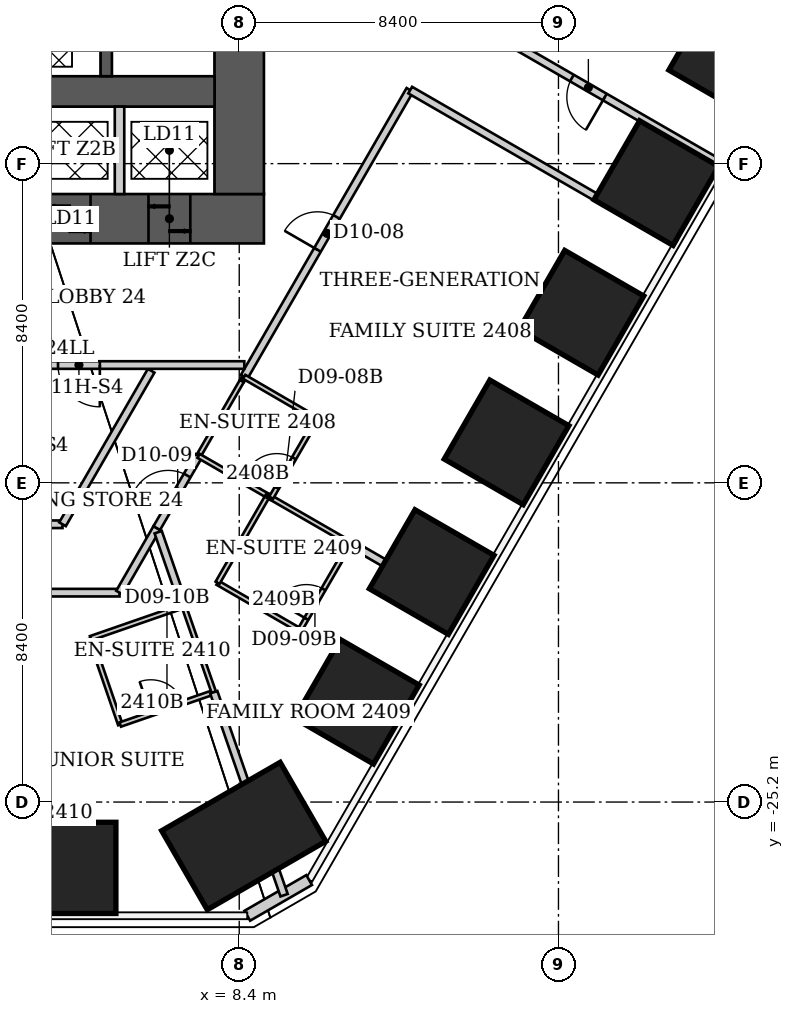
"""IFC4 building model, lengths in metres.
Left out: names, types, materials, properties, quantities, classifications, styles, units other than length and angle.
Written with IfcOpenShell. Run it as: python <this file> out.ifc"""

import sys

from ifc_helpers import new_model, si_unit, direction, frame, frame_2d, origin, origin_2d, place, context, subcontext, project, spatial, rectangle, extrude, element, fill, save


model = new_model("IFC4")
c1 = context("Model", 3, precision=1e-05, world=origin(), true_north=direction((0.0, 1.0)))
c2 = subcontext(c1, "Body", "Model", "MODEL_VIEW")
j1 = project(units=[si_unit("LENGTHUNIT", "METRE"), si_unit("PLANEANGLEUNIT", "RADIAN")], contexts=[c1])
p1 = place(None, origin())
s1 = spatial("IfcSite", under=j1, at=p1, CompositionType="ELEMENT")
p2 = place(p1, origin())
s2 = spatial("IfcBuilding", under=s1, at=p2, CompositionType="ELEMENT")
p3 = place(p2, frame((0.0, 0.0, 100.6)))
s3 = spatial("IfcBuildingStorey", under=s2, at=p3, CompositionType="ELEMENT", Elevation=100.6)
for number, where, z_axis, x_axis in (
    (1, (21.344, -5.499, 0.0), (0.0, 0.0, 1.0), (0.866, -0.5, 0.0)),
    (2, (19.374, -8.911, 0.0), (0.0, 0.0, 1.0), (0.866, -0.5, 0.0)),
    (3, (17.404, -12.323, 0.0), (0.0, 0.0, 1.0), (0.866, -0.5, 0.0)),
    (4, (15.434, -15.735, 0.0), (0.0, 0.0, 1.0), (0.866, -0.5, 0.0)),
    (5, (13.464, -19.147, 0.0), (0.0, 0.0, 1.0), (0.866, -0.5, 0.0)),
    (6, (11.494, -22.559, 0.0), (0.0, 0.0, 1.0), (0.866, -0.5, 0.0)),
):
    element("IfcColumn", number, at=place(p3, frame(where, z_axis=z_axis, x_axis=x_axis)), inside=s3, PredefinedType="COLUMN", context=c2, shape_type="SweptSolid", body=[
        extrude(rectangle(XDim=2.4, YDim=2.4, at=origin_2d()), origin(), (0.0, 0.0, 1.0), 3.8),
    ])
p4 = place(p3, frame((8.518, -26.094, 0.0), z_axis=(0.0, 0.0, 1.0), x_axis=(0.5, -0.866025403784, 0.0)))
e7 = element("IfcColumn", 7, at=p4, inside=s3, PredefinedType="COLUMN", context=c2, shape_type="SweptSolid", body=[
    extrude(rectangle(XDim=2.4, YDim=3.6, at=origin_2d()), origin(), (0.0, 0.0, 1.0), 3.8),
])
p5 = place(p3, frame((3.955, -26.932, 0.0), z_axis=(0.0, 0.0, 1.0), x_axis=(0.0, -1.0, 0.0)))
e8 = element("IfcColumn", 8, at=p5, inside=s3, PredefinedType="COLUMN", context=c2, shape_type="SweptSolid", body=[
    extrude(rectangle(XDim=2.4, YDim=2.4, at=origin_2d()), origin(), (0.0, 0.0, 1.0), 3.8),
])
p6 = place(p3, frame((-9.05, -9.85, 0.0), z_axis=(0.0, 0.0, 1.0), x_axis=(1.0, 0.0, 0.0)))
e9 = element("IfcWall", 9, at=p6, inside=s3, PredefinedType="SHEAR", context=c2, shape_type="SweptSolid", body=[
    extrude(rectangle(XDim=18.1, YDim=1.3, at=frame_2d((9.05, 0.0))), origin(), (0.0, 0.0, 1.0), 3.8),
])
p7 = place(p6, frame((1.938, 0.0, 0.0)))
e10 = element("IfcOpeningElement", 10, at=p7, cuts=e9, PredefinedType="OPENING", context=c2, shape_type="SweptSolid", body=[
    extrude(rectangle(XDim=1.1, YDim=2.2, at=frame_2d((0.55, 1.1))), frame((0.0, 0.65, 0.0), z_axis=(0.0, -1.0, 0.0), x_axis=(1.0, 0.0, 0.0)), (0.0, 0.0, 1.0), 1.3),
])
p8 = place(p6, frame((9.812, 0.0, 0.0)))
e11 = element("IfcOpeningElement", 11, at=p8, cuts=e9, PredefinedType="OPENING", context=c2, shape_type="SweptSolid", body=[
    extrude(rectangle(XDim=1.1, YDim=2.1, at=frame_2d((0.55, 1.05))), frame((0.0, 0.65, 0.0), z_axis=(0.0, -1.0, 0.0), x_axis=(1.0, 0.0, 0.0)), (0.0, 0.0, 1.0), 1.3),
])
p9 = place(p6, frame((12.438, 0.0, 0.0)))
e12 = element("IfcOpeningElement", 12, at=p9, cuts=e9, PredefinedType="OPENING", context=c2, shape_type="SweptSolid", body=[
    extrude(rectangle(XDim=1.1, YDim=2.1, at=frame_2d((0.55, 1.05))), frame((0.0, 0.65, 0.0), z_axis=(0.0, -1.0, 0.0), x_axis=(1.0, 0.0, 0.0)), (0.0, 0.0, 1.0), 1.3),
])
p10 = place(p6, frame((15.062, 0.0, 0.0)))
e13 = element("IfcOpeningElement", 13, at=p10, cuts=e9, PredefinedType="OPENING", context=c2, shape_type="SweptSolid", body=[
    extrude(rectangle(XDim=1.1, YDim=2.1, at=frame_2d((0.55, 1.05))), frame((0.0, 0.65, 0.0), z_axis=(0.0, -1.0, 0.0), x_axis=(1.0, 0.0, 0.0)), (0.0, 0.0, 1.0), 1.3),
])
p11 = place(p3, frame((8.4, -9.2, 0.0), z_axis=(0.0, 0.0, 1.0), x_axis=(0.0, 1.0, 0.0)))
e14 = element("IfcWall", 14, at=p11, inside=s3, PredefinedType="SHEAR", context=c2, shape_type="SweptSolid", body=[
    extrude(rectangle(XDim=15.3, YDim=1.3, at=frame_2d((7.65, 0.0))), origin(), (0.0, 0.0, 1.0), 3.8),
])
p12 = place(p11, frame((10.7, 0.0, 0.0)))
e15 = element("IfcOpeningElement", 15, at=p12, cuts=e14, PredefinedType="OPENING", context=c2, shape_type="SweptSolid", body=[
    extrude(rectangle(XDim=1.2, YDim=2.2, at=frame_2d((0.6, 1.1))), frame((0.0, 0.65, 0.0), z_axis=(0.0, -1.0, 0.0), x_axis=(1.0, 0.0, 0.0)), (0.0, 0.0, 1.0), 1.3),
])
p13 = place(p3, frame((-7.75, -6.5, 0.0), z_axis=(0.0, 0.0, 1.0), x_axis=(1.0, 0.0, 0.0)))
e16 = element("IfcWall", 16, at=p13, inside=s3, PredefinedType="SHEAR", context=c2, shape_type="SweptSolid", body=[
    extrude(rectangle(XDim=15.5, YDim=0.8, at=frame_2d((7.75, 0.0))), origin(), (0.0, 0.0, 1.0), 3.8),
])
p14 = place(p3, frame((4.9, -6.1, 0.0), z_axis=(0.0, 0.0, 1.0), x_axis=(0.0, 1.0, 0.0)))
e17 = element("IfcWall", 17, at=p14, inside=s3, PredefinedType="SHEAR", context=c2, shape_type="SweptSolid", body=[
    extrude(rectangle(XDim=7.2, YDim=0.3, at=frame_2d((3.6, 0.0))), origin(), (0.0, 0.0, 1.0), 3.8),
])
p15 = place(p3, frame((5.25, -9.2, 0.0), z_axis=(0.0, 0.0, 1.0), x_axis=(0.0, 1.0, 0.0)))
e18 = element("IfcWall", 18, at=p15, inside=s3, PredefinedType="PARTITIONING", context=c2, shape_type="SweptSolid", body=[
    extrude(rectangle(XDim=2.3, YDim=0.25, at=frame_2d((1.15, 0.0))), origin(), (0.0, 0.0, 1.0), 3.8),
])
p16 = place(p3, frame((10.24, -27.252, 0.0), z_axis=(0.0, 0.0, 1.0), x_axis=(-0.866045024864, -0.499966013754, 0.0)))
e19 = element("IfcWall", 19, at=p16, inside=s3, PredefinedType="SOLIDWALL", context=c2, shape_type="SweptSolid", body=[
    extrude(rectangle(XDim=1.88, YDim=0.3, at=frame_2d((0.94, 0.0))), origin(), (0.0, 0.0, 1.0), 3.64),
])
p17 = place(p3, frame((1.215, -19.69, 0.0), z_axis=(0.0, 0.0, 1.0), x_axis=(1.0, 0.0, 0.0)))
e20 = element("IfcWall", 20, at=p17, inside=s3, PredefinedType="PARTITIONING", context=c2, shape_type="SweptSolid", body=[
    extrude(rectangle(XDim=4.035, YDim=0.2, at=frame_2d((2.018, 0.0))), origin(), (0.0, 0.0, 1.0), 3.64),
])
p18 = place(p3, frame((3.75, -17.89, 0.0), z_axis=(0.0, 0.0, 1.0), x_axis=(-1.0, 0.0, 0.0)))
e21 = element("IfcWall", 21, at=p18, inside=s3, PredefinedType="PARTITIONING", context=c2, shape_type="SweptSolid", body=[
    extrude(rectangle(XDim=2.15, YDim=0.2, at=frame_2d((1.075, 0.0))), origin(), (0.0, 0.0, 1.0), 3.64),
])
p19 = place(p3, frame((4.49, -20.89, 0.0), z_axis=(0.0, 0.0, 1.0), x_axis=(0.324971746724, -0.945723724896, 0.0)))
e22 = element("IfcWall", 22, at=p19, inside=s3, PredefinedType="PARTITIONING", context=c2, shape_type="SweptSolid", body=[
    extrude(rectangle(XDim=2.4, YDim=0.12, at=frame_2d((1.2, 0.0))), origin(), (0.0, 0.0, 1.0), 3.64),
])
p20 = place(p3, frame((5.25, -19.69, 0.0), z_axis=(0.0, 0.0, 1.0), x_axis=(0.499431599995, 0.866353321068, 0.0)))
e23 = element("IfcWall", 23, at=p20, inside=s3, PredefinedType="PARTITIONING", context=c2, shape_type="SweptSolid", body=[
    extrude(rectangle(XDim=1.962, YDim=0.2, at=frame_2d((0.981, 0.0))), origin(), (0.0, 0.0, 1.0), 3.64),
])
p21 = place(p3, frame((5.27, -23.16, 0.0), z_axis=(0.0, 0.0, 1.0), x_axis=(0.945184415197, 0.326537013627, 0.0)))
e24 = element("IfcWall", 24, at=p21, inside=s3, PredefinedType="PARTITIONING", context=c2, shape_type="SweptSolid", body=[
    extrude(rectangle(XDim=2.603, YDim=0.12, at=frame_2d((1.301, 0.0))), origin(), (0.0, 0.0, 1.0), 3.64),
])
p22 = place(p21, frame((0.85, 0.0, 0.0)))
e25 = element("IfcOpeningElement", 25, at=p22, cuts=e24, PredefinedType="OPENING", context=c2, shape_type="SweptSolid", body=[
    extrude(rectangle(XDim=0.9, YDim=2.03, at=frame_2d((0.45, 1.015))), frame((0.0, 0.06, 0.0), z_axis=(0.0, -1.0, 0.0), x_axis=(1.0, 0.0, 0.0)), (0.0, 0.0, 1.0), 0.12),
])
p23 = place(p3, frame((6.083, -13.85, 0.0), z_axis=(0.0, 0.0, 1.0), x_axis=(-0.499977643516, -0.866038310922, 0.0)))
e26 = element("IfcWall", 26, at=p23, inside=s3, PredefinedType="PARTITIONING", context=c2, shape_type="SweptSolid", body=[
    extrude(rectangle(XDim=4.665, YDim=0.2, at=frame_2d((2.333, 0.0))), origin(), (0.0, 0.0, 1.0), 3.64),
])
p24 = place(p3, frame((6.23, -17.99, 0.0), z_axis=(0.0, 0.0, 1.0), x_axis=(0.501088872721, 0.865395829453, 0.0)))
e27 = element("IfcWall", 27, at=p24, inside=s3, PredefinedType="PARTITIONING", context=c2, shape_type="SweptSolid", body=[
    extrude(rectangle(XDim=2.195, YDim=0.2, at=frame_2d((1.098, 0.0))), origin(), (0.0, 0.0, 1.0), 3.64),
])
p25 = place(p24, frame((0.598, 0.0, 0.0)))
e28 = element("IfcOpeningElement", 28, at=p25, cuts=e27, PredefinedType="OPENING", context=c2, shape_type="SweptSolid", body=[
    extrude(rectangle(XDim=1.0, YDim=2.13, at=frame_2d((0.5, 1.065))), frame((0.0, 0.1, 0.0), z_axis=(0.0, -1.0, 0.0), x_axis=(1.0, 0.0, 0.0)), (0.0, 0.0, 1.0), 0.2),
])
p26 = place(p3, frame((6.268, -18.099, 0.0), z_axis=(0.0, 0.0, 1.0), x_axis=(0.327257488288, -0.944935202202, 0.0)))
e29 = element("IfcWall", 29, at=p26, inside=s3, PredefinedType="PARTITIONING", context=c2, shape_type="SweptSolid", body=[
    extrude(rectangle(XDim=2.054, YDim=0.2, at=frame_2d((1.027, 0.0))), origin(), (0.0, 0.0, 1.0), 3.64),
])
p27 = place(p3, frame((6.94, -20.04, 0.0), z_axis=(0.0, 0.0, 1.0), x_axis=(-0.944772080486, -0.327728112822, 0.0)))
e30 = element("IfcWall", 30, at=p27, inside=s3, PredefinedType="PARTITIONING", context=c2, shape_type="SweptSolid", body=[
    extrude(rectangle(XDim=2.593, YDim=0.12, at=frame_2d((1.297, 0.0))), origin(), (0.0, 0.0, 1.0), 3.64),
])
p28 = place(p3, frame((6.94, -20.04, 0.0), z_axis=(0.0, 0.0, 1.0), x_axis=(0.328693963496, -0.944436487203, 0.0)))
e31 = element("IfcWall", 31, at=p28, inside=s3, PredefinedType="PARTITIONING", context=c2, shape_type="SweptSolid", body=[
    extrude(rectangle(XDim=2.404, YDim=0.12, at=frame_2d((1.202, 0.0))), origin(), (0.0, 0.0, 1.0), 3.64),
])
p29 = place(p3, frame((7.33, -16.09, 0.0), z_axis=(0.0, 0.0, 1.0), x_axis=(0.500786797394, 0.865570669302, 0.0)))
e32 = element("IfcWall", 32, at=p29, inside=s3, PredefinedType="PARTITIONING", context=c2, shape_type="SweptSolid", body=[
    extrude(rectangle(XDim=2.276, YDim=0.12, at=frame_2d((1.138, 0.0))), origin(), (0.0, 0.0, 1.0), 3.64),
])
p30 = place(p3, frame((7.33, -16.09, 0.0), z_axis=(0.0, 0.0, 1.0), x_axis=(0.86618365172, -0.499725806311, 0.0)))
e33 = element("IfcWall", 33, at=p30, inside=s3, PredefinedType="PARTITIONING", context=c2, shape_type="SweptSolid", body=[
    extrude(rectangle(XDim=2.101, YDim=0.12, at=frame_2d((1.051, 0.0))), origin(), (0.0, 0.0, 1.0), 3.64),
])
p31 = place(p3, frame((7.73, -22.31, 0.0), z_axis=(0.0, 0.0, 1.0), x_axis=(0.327284111977, -0.944925981253, 0.0)))
e34 = element("IfcWall", 34, at=p31, inside=s3, PredefinedType="PARTITIONING", context=c2, shape_type="SweptSolid", body=[
    extrude(rectangle(XDim=5.653, YDim=0.2, at=frame_2d((2.826, 0.0))), origin(), (0.0, 0.0, 1.0), 3.64),
])
p32 = place(p3, frame((7.83, -19.43, 0.0), z_axis=(0.0, 0.0, 1.0), x_axis=(0.865508881864, -0.500893576935, 0.0)))
e35 = element("IfcWall", 35, at=p32, inside=s3, PredefinedType="PARTITIONING", context=c2, shape_type="SweptSolid", body=[
    extrude(rectangle(XDim=2.496, YDim=0.12, at=frame_2d((1.248, 0.0))), origin(), (0.0, 0.0, 1.0), 3.64),
])
p33 = place(p3, frame((8.47, -14.12, 0.0), z_axis=(0.0, 0.0, 1.0), x_axis=(0.478852130681, 0.877895572914, 0.0)))
e36 = element("IfcWall", 36, at=p33, inside=s3, PredefinedType="PARTITIONING", context=c2, shape_type="SweptSolid", body=[
    extrude(rectangle(XDim=0.125, YDim=0.12, at=frame_2d((0.063, 0.0))), origin(), (0.0, 0.0, 1.0), 3.64),
])
p34 = place(p3, frame((8.53, -14.01, 0.0), z_axis=(0.0, 0.0, 1.0), x_axis=(0.500072306674, 0.865983653482, 0.0)))
e37 = element("IfcWall", 37, at=p34, inside=s3, PredefinedType="PARTITIONING", context=c2, shape_type="SweptSolid", body=[
    extrude(rectangle(XDim=8.719, YDim=0.2, at=frame_2d((4.359, 0.0))), origin(), (0.0, 0.0, 1.0), 3.64),
])
p35 = place(p34, frame((3.859, 0.0, 0.0)))
e38 = element("IfcOpeningElement", 38, at=p35, cuts=e37, PredefinedType="OPENING", context=c2, shape_type="SweptSolid", body=[
    extrude(rectangle(XDim=1.0, YDim=2.13, at=frame_2d((0.5, 1.065))), frame((0.0, 0.1, 0.0), z_axis=(0.0, -1.0, 0.0), x_axis=(1.0, 0.0, 0.0)), (0.0, 0.0, 1.0), 0.2),
])
p36 = place(p3, frame((8.534, -13.7, 0.0), z_axis=(0.0, 0.0, 1.0), x_axis=(-1.0, 0.0, 0.0)))
e39 = element("IfcWall", 39, at=p36, inside=s3, PredefinedType="PARTITIONING", context=c2, shape_type="SweptSolid", body=[
    extrude(rectangle(XDim=8.704, YDim=0.2, at=frame_2d((4.352, 0.0))), origin(), (0.0, 0.0, 1.0), 3.64),
])
p37 = place(p36, frame((3.802, 0.0, 0.0)))
e40 = element("IfcOpeningElement", 40, at=p37, cuts=e39, PredefinedType="OPENING", context=c2, shape_type="SweptSolid", body=[
    extrude(rectangle(XDim=1.1, YDim=2.2, at=frame_2d((0.55, 1.1))), frame((0.0, 0.1, 0.0), z_axis=(0.0, -1.0, 0.0), x_axis=(1.0, 0.0, 0.0)), (0.0, 0.0, 1.0), 0.2),
])
p38 = place(p3, frame((9.15, -17.14, 0.0), z_axis=(0.0, 0.0, 1.0), x_axis=(-0.499338582192, -0.866406936915, 0.0)))
e41 = element("IfcWall", 41, at=p38, inside=s3, PredefinedType="PARTITIONING", context=c2, shape_type="SweptSolid", body=[
    extrude(rectangle(XDim=2.643, YDim=0.12, at=frame_2d((1.322, 0.0))), origin(), (0.0, 0.0, 1.0), 3.64),
])
p39 = place(p3, frame((9.15, -17.14, 0.0), z_axis=(0.0, 0.0, 1.0), x_axis=(0.867366768559, -0.49766945737, 0.0)))
e42 = element("IfcWall", 42, at=p39, inside=s3, PredefinedType="PARTITIONING", context=c2, shape_type="SweptSolid", body=[
    extrude(rectangle(XDim=0.103, YDim=0.12, at=frame_2d((0.052, 0.0))), origin(), (0.0, 0.0, 1.0), 3.64),
])
p40 = place(p3, frame((9.239, -17.191, 0.0), z_axis=(0.0, 0.0, 1.0), x_axis=(0.86649853798, -0.49917961064, 0.0)))
e43 = element("IfcWall", 43, at=p40, inside=s3, PredefinedType="PARTITIONING", context=c2, shape_type="SweptSolid", body=[
    extrude(rectangle(XDim=2.401, YDim=0.12, at=frame_2d((1.201, 0.0))), origin(), (0.0, 0.0, 1.0), 3.64),
])
p41 = place(p3, frame((9.24, -17.19, 0.0), z_axis=(0.0, 0.0, 1.0), x_axis=(0.501502765098, 0.865156041763, 0.0)))
e44 = element("IfcWall", 44, at=p41, inside=s3, PredefinedType="PARTITIONING", context=c2, shape_type="SweptSolid", body=[
    extrude(rectangle(XDim=2.393, YDim=0.12, at=frame_2d((1.196, 0.0))), origin(), (0.0, 0.0, 1.0), 3.64),
])
p42 = place(p41, frame((0.3, 0.0, 0.0)))
e45 = element("IfcOpeningElement", 45, at=p42, cuts=e44, PredefinedType="OPENING", context=c2, shape_type="SweptSolid", body=[
    extrude(rectangle(XDim=0.9, YDim=2.03, at=frame_2d((0.45, 1.015))), frame((0.0, 0.06, 0.0), z_axis=(0.0, -1.0, 0.0), x_axis=(1.0, 0.0, 0.0)), (0.0, 0.0, 1.0), 0.12),
])
p43 = place(p3, frame((9.99, -20.68, 0.0), z_axis=(0.0, 0.0, 1.0), x_axis=(0.502242265546, 0.864726954997, 0.0)))
e46 = element("IfcWall", 46, at=p43, inside=s3, PredefinedType="PARTITIONING", context=c2, shape_type="SweptSolid", body=[
    extrude(rectangle(XDim=2.648, YDim=0.12, at=frame_2d((1.324, 0.0))), origin(), (0.0, 0.0, 1.0), 3.64),
])
p44 = place(p43, frame((0.35, 0.0, 0.0)))
e47 = element("IfcOpeningElement", 47, at=p44, cuts=e46, PredefinedType="OPENING", context=c2, shape_type="SweptSolid", body=[
    extrude(rectangle(XDim=0.9, YDim=2.03, at=frame_2d((0.45, 1.015))), frame((0.0, 0.06, 0.0), z_axis=(0.0, -1.0, 0.0), x_axis=(1.0, 0.0, 0.0)), (0.0, 0.0, 1.0), 0.12),
])
p45 = place(p3, frame((10.44, -15.12, 0.0), z_axis=(0.0, 0.0, 1.0), x_axis=(-0.864567486339, 0.502516727647, 0.0)))
e48 = element("IfcWall", 48, at=p45, inside=s3, PredefinedType="PARTITIONING", context=c2, shape_type="SweptSolid", body=[
    extrude(rectangle(XDim=2.209, YDim=0.12, at=frame_2d((1.104, 0.0))), origin(), (0.0, 0.0, 1.0), 3.023),
])
p46 = place(p3, frame((11.32, -18.39, 0.0), z_axis=(0.0, 0.0, 1.0), x_axis=(0.865917229834, -0.50018731599, 0.0)))
e49 = element("IfcWall", 49, at=p46, inside=s3, PredefinedType="PARTITIONING", context=c2, shape_type="SweptSolid", body=[
    extrude(rectangle(XDim=3.379, YDim=0.2, at=frame_2d((1.689, 0.0))), origin(), (0.0, 0.0, 1.0), 3.64),
])
p47 = place(p3, frame((12.899, -6.465, 0.0), z_axis=(0.0, 0.0, 1.0), x_axis=(0.866184578051, -0.499724200681, 0.0)))
e50 = element("IfcWall", 50, at=p47, inside=s3, PredefinedType="PARTITIONING", context=c2, shape_type="SweptSolid", body=[
    extrude(rectangle(XDim=8.064, YDim=0.2, at=frame_2d((4.032, 0.0))), origin(), (0.0, 0.0, 1.0), 3.64),
])
p48 = place(p3, frame((21.084, -8.415, 0.0), z_axis=(0.0, 0.0, 1.0), x_axis=(-0.866174008169, 0.499742521277, 0.0)))
e51 = element("IfcWall", 51, at=p48, inside=s3, PredefinedType="PARTITIONING", context=c2, shape_type="SweptSolid", body=[
    extrude(rectangle(XDim=8.074, YDim=0.2, at=frame_2d((4.037, 0.0))), origin(), (0.0, 0.0, 1.0), 3.64),
])
p49 = place(p48, frame((3.537, 0.0, 0.0)))
e52 = element("IfcOpeningElement", 52, at=p49, cuts=e51, PredefinedType="OPENING", context=c2, shape_type="SweptSolid", body=[
    extrude(rectangle(XDim=1.0, YDim=2.13, at=frame_2d((0.5, 1.065))), frame((0.0, 0.1, 0.0), z_axis=(0.0, -1.0, 0.0), x_axis=(1.0, 0.0, 0.0)), (0.0, 0.0, 1.0), 0.2),
])
p50 = place(p49, origin())
e53 = element("IfcDoor", 53, at=p50, inside=s3, OperationType="SINGLE_SWING_LEFT", PredefinedType="DOOR", context=c2, shape_type="SweptSolid", body=[
    extrude(rectangle(XDim=1.0, YDim=2.13, at=frame_2d((0.5, 1.065))), frame((0.0, 0.025, 0.0), z_axis=(0.0, -1.0, 0.0), x_axis=(1.0, 0.0, 0.0)), (0.0, 0.0, 1.0), 0.05),
])
fill(e52, e53)
p51 = place(p35, origin())
e54 = element("IfcDoor", 54, at=p51, inside=s3, OperationType="SINGLE_SWING_LEFT", PredefinedType="DOOR", context=c2, shape_type="SweptSolid", body=[
    extrude(rectangle(XDim=1.0, YDim=2.13, at=frame_2d((0.5, 1.065))), frame((0.0, 0.025, 0.0), z_axis=(0.0, -1.0, 0.0), x_axis=(1.0, 0.0, 0.0)), (0.0, 0.0, 1.0), 0.05),
])
fill(e38, e54)
p52 = place(p42, origin())
e55 = element("IfcDoor", 55, at=p52, inside=s3, OperationType="SINGLE_SWING_LEFT", PredefinedType="DOOR", context=c2, shape_type="SweptSolid", body=[
    extrude(rectangle(XDim=0.9, YDim=2.03, at=frame_2d((0.45, 1.015))), frame((0.0, 0.025, 0.0), z_axis=(0.0, -1.0, 0.0), x_axis=(1.0, 0.0, 0.0)), (0.0, 0.0, 1.0), 0.05),
])
fill(e45, e55)
p53 = place(p25, origin())
e56 = element("IfcDoor", 56, at=p53, inside=s3, OperationType="SINGLE_SWING_LEFT", PredefinedType="DOOR", context=c2, shape_type="SweptSolid", body=[
    extrude(rectangle(XDim=1.0, YDim=2.13, at=frame_2d((0.5, 1.065))), frame((0.0, 0.025, 0.0), z_axis=(0.0, -1.0, 0.0), x_axis=(1.0, 0.0, 0.0)), (0.0, 0.0, 1.0), 0.05),
])
fill(e28, e56)
p54 = place(p44, origin())
e57 = element("IfcDoor", 57, at=p54, inside=s3, OperationType="SINGLE_SWING_LEFT", PredefinedType="DOOR", context=c2, shape_type="SweptSolid", body=[
    extrude(rectangle(XDim=0.9, YDim=2.03, at=frame_2d((0.45, 1.015))), frame((0.0, 0.025, 0.0), z_axis=(0.0, -1.0, 0.0), x_axis=(1.0, 0.0, 0.0)), (0.0, 0.0, 1.0), 0.05),
])
fill(e47, e57)
p55 = place(p22, origin())
e58 = element("IfcDoor", 58, at=p55, inside=s3, OperationType="SINGLE_SWING_LEFT", PredefinedType="DOOR", context=c2, shape_type="SweptSolid", body=[
    extrude(rectangle(XDim=0.9, YDim=2.03, at=frame_2d((0.45, 1.015))), frame((0.0, 0.025, 0.0), z_axis=(0.0, -1.0, 0.0), x_axis=(1.0, 0.0, 0.0)), (0.0, 0.0, 1.0), 0.05),
])
fill(e25, e58)
p56 = place(p37, origin())
e59 = element("IfcDoor", 59, at=p56, inside=s3, OperationType="SINGLE_SWING_LEFT", PredefinedType="DOOR", context=c2, shape_type="SweptSolid", body=[
    extrude(rectangle(XDim=1.1, YDim=2.2, at=frame_2d((0.55, 1.1))), frame((0.0, 0.025, 0.0), z_axis=(0.0, -1.0, 0.0), x_axis=(1.0, 0.0, 0.0)), (0.0, 0.0, 1.0), 0.05),
])
fill(e40, e59)
p57 = place(p9, origin())
e60 = element("IfcDoor", 60, at=p57, inside=s3, OperationType="DOUBLE_DOOR_SLIDING", PredefinedType="DOOR", context=c2, shape_type="SweptSolid", body=[
    extrude(rectangle(XDim=1.1, YDim=2.1, at=frame_2d((0.55, 1.05))), frame((0.0, 0.025, 0.0), z_axis=(0.0, -1.0, 0.0), x_axis=(1.0, 0.0, 0.0)), (0.0, 0.0, 1.0), 0.05),
])
fill(e12, e60)
p58 = place(p10, origin())
e61 = element("IfcDoor", 61, at=p58, inside=s3, OperationType="DOUBLE_DOOR_SLIDING", PredefinedType="DOOR", context=c2, shape_type="SweptSolid", body=[
    extrude(rectangle(XDim=1.1, YDim=2.1, at=frame_2d((0.55, 1.05))), frame((0.0, 0.025, 0.0), z_axis=(0.0, -1.0, 0.0), x_axis=(1.0, 0.0, 0.0)), (0.0, 0.0, 1.0), 0.05),
])
fill(e13, e61)
save(model, sys.argv[1])
